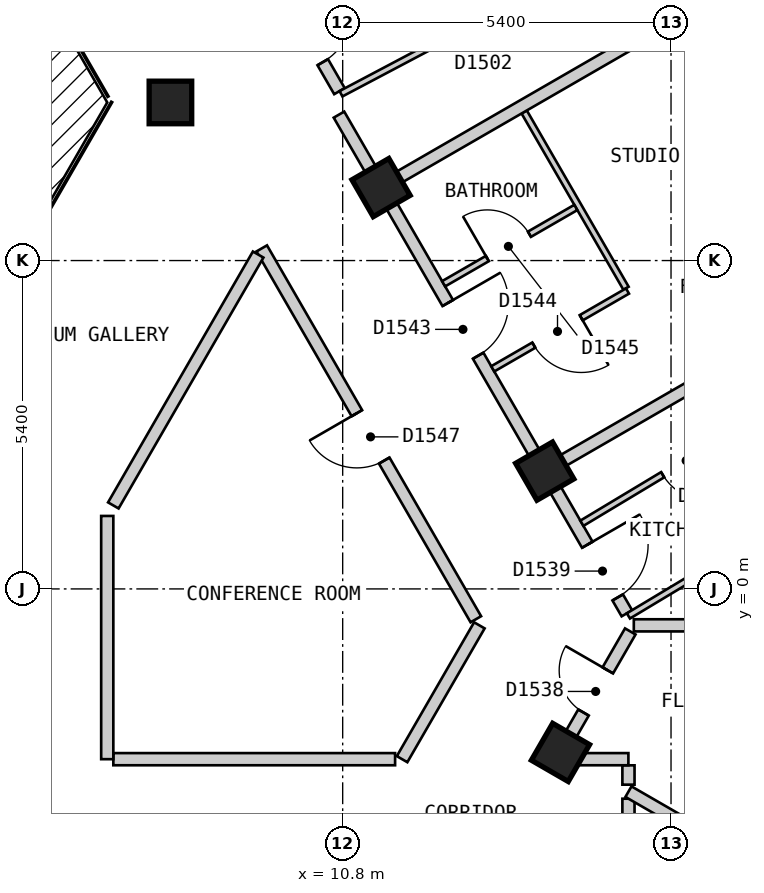
"""IFC4 building model, lengths in metres.
Left out: names, types, materials, properties, quantities, classifications, styles, units other than length and angle.
Written with IfcOpenShell. Run it as: python <this file> out.ifc"""

import sys

from ifc_helpers import new_model, si_unit, direction, frame, frame_2d, origin, origin_2d, place, context, subcontext, project, spatial, polyline, rectangle, outline, extrude, element, fill, save


model = new_model("IFC4")
c1 = context("Model", 3, precision=1e-05, world=origin(), true_north=direction((0.0, 1.0)))
c2 = subcontext(c1, "Body", "Model", "MODEL_VIEW")
j1 = project(units=[si_unit("LENGTHUNIT", "METRE"), si_unit("PLANEANGLEUNIT", "RADIAN")], contexts=[c1])
p1 = place(None, origin())
s1 = spatial("IfcSite", under=j1, at=p1, CompositionType="ELEMENT")
p2 = place(p1, origin())
s2 = spatial("IfcBuilding", under=s1, at=p2, CompositionType="ELEMENT")
p3 = place(p2, frame((0.0, 0.0, 190.2)))
s3 = spatial("IfcBuildingStorey", under=s2, at=p3, CompositionType="ELEMENT", Elevation=190.2)
for number, where, z_axis, x_axis in (
    (1, (14.382, -2.689, 0.0), (0.0, 0.0, 1.0), (0.5, 0.866, 0.0)),
    (2, (14.123, 1.937, 0.0), (0.0, 0.0, 1.0), (-0.5, 0.866, 0.0)),
    (3, (11.431, 6.6, 0.0), (0.0, 0.0, 1.0), (-0.5, 0.866, 0.0)),
    (4, (7.967, 8.0, 0.0), (0.0, 0.0, 1.0), (1.0, 0.0, 0.0)),
):
    element("IfcColumn", number, at=place(p3, frame(where, z_axis=z_axis, x_axis=x_axis)), inside=s3, PredefinedType="COLUMN", context=c2, shape_type="SweptSolid", body=[
        extrude(rectangle(XDim=0.7, YDim=0.7, at=origin_2d()), origin(), (0.0, 0.0, 1.0), 3.0),
    ])
p4 = place(p3, frame((15.631, -21.025, 0.0), z_axis=(0.0, 0.0, 1.0), x_axis=(0.500018670445, 0.86601462413, 0.0)))
e5 = element("IfcWall", 5, at=p4, inside=s3, PredefinedType="SOLIDWALL", context=c2, shape_type="SweptSolid", body=[
    extrude(outline(polyline([(0.0, -0.15), (20.785, -0.15), (20.705, 0.15), (0.08, 0.15), (0.0, -0.15)])), origin(), (0.0, 0.0, 1.0), 2.7),
])
p5 = place(p4, frame((1.13, 0.0, 0.15)))
e6 = element("IfcOpeningElement", 6, at=p5, cuts=e5, PredefinedType="OPENING", context=c2, shape_type="SweptSolid", body=[
    extrude(rectangle(XDim=1.5, YDim=2.1, at=frame_2d((0.75, 1.05))), frame((0.0, 0.16, 0.0), z_axis=(0.0, -1.0, 0.0), x_axis=(1.0, 0.0, 0.0)), (0.0, 0.0, 1.0), 0.32),
])
p6 = place(p4, frame((3.562, 0.0, 0.15)))
e7 = element("IfcOpeningElement", 7, at=p6, cuts=e5, PredefinedType="OPENING", context=c2, shape_type="SweptSolid", body=[
    extrude(rectangle(XDim=1.5, YDim=2.1, at=frame_2d((0.75, 1.05))), frame((0.0, 0.16, 0.0), z_axis=(0.0, -1.0, 0.0), x_axis=(1.0, 0.0, 0.0)), (0.0, 0.0, 1.0), 0.32),
])
p7 = place(p4, frame((5.994, 0.0, 0.15)))
e8 = element("IfcOpeningElement", 8, at=p7, cuts=e5, PredefinedType="OPENING", context=c2, shape_type="SweptSolid", body=[
    extrude(rectangle(XDim=1.5, YDim=2.1, at=frame_2d((0.75, 1.05))), frame((0.0, 0.16, 0.0), z_axis=(0.0, -1.0, 0.0), x_axis=(1.0, 0.0, 0.0)), (0.0, 0.0, 1.0), 0.32),
])
p8 = place(p4, frame((8.425, 0.0, 0.15)))
e9 = element("IfcOpeningElement", 9, at=p8, cuts=e5, PredefinedType="OPENING", context=c2, shape_type="SweptSolid", body=[
    extrude(rectangle(XDim=1.5, YDim=2.1, at=frame_2d((0.75, 1.05))), frame((0.0, 0.16, 0.0), z_axis=(0.0, -1.0, 0.0), x_axis=(1.0, 0.0, 0.0)), (0.0, 0.0, 1.0), 0.32),
])
p9 = place(p4, frame((10.857, 0.0, 0.15)))
e10 = element("IfcOpeningElement", 10, at=p9, cuts=e5, PredefinedType="OPENING", context=c2, shape_type="SweptSolid", body=[
    extrude(rectangle(XDim=1.5, YDim=2.1, at=frame_2d((0.75, 1.05))), frame((0.0, 0.16, 0.0), z_axis=(0.0, -1.0, 0.0), x_axis=(1.0, 0.0, 0.0)), (0.0, 0.0, 1.0), 0.32),
])
p10 = place(p4, frame((13.289, 0.0, 0.15)))
e11 = element("IfcOpeningElement", 11, at=p10, cuts=e5, PredefinedType="OPENING", context=c2, shape_type="SweptSolid", body=[
    extrude(rectangle(XDim=1.5, YDim=2.1, at=frame_2d((0.75, 1.05))), frame((0.0, 0.16, 0.0), z_axis=(0.0, -1.0, 0.0), x_axis=(1.0, 0.0, 0.0)), (0.0, 0.0, 1.0), 0.32),
])
p11 = place(p4, frame((15.722, 0.0, 0.15)))
e12 = element("IfcOpeningElement", 12, at=p11, cuts=e5, PredefinedType="OPENING", context=c2, shape_type="SweptSolid", body=[
    extrude(rectangle(XDim=1.5, YDim=2.1, at=frame_2d((0.75, 1.05))), frame((0.0, 0.16, 0.0), z_axis=(0.0, -1.0, 0.0), x_axis=(1.0, 0.0, 0.0)), (0.0, 0.0, 1.0), 0.32),
])
p12 = place(p4, frame((18.154, 0.0, 0.15)))
e13 = element("IfcOpeningElement", 13, at=p12, cuts=e5, PredefinedType="OPENING", context=c2, shape_type="SweptSolid", body=[
    extrude(rectangle(XDim=1.5, YDim=2.1, at=frame_2d((0.75, 1.05))), frame((0.0, 0.16, 0.0), z_axis=(0.0, -1.0, 0.0), x_axis=(1.0, 0.0, 0.0)), (0.0, 0.0, 1.0), 0.32),
])
p13 = place(p3, frame((26.024, 1.825, 0.0), z_axis=(0.0, 0.0, 1.0), x_axis=(-0.500010537973, 0.866019319597, 0.0)))
e14 = element("IfcWall", 14, at=p13, inside=s3, PredefinedType="SOLIDWALL", context=c2, shape_type="SweptSolid", body=[
    extrude(outline(polyline([(0.0, -0.15), (22.863, -0.15), (22.783, 0.15), (0.08, 0.15), (0.0, -0.15)])), origin(), (0.0, 0.0, 1.0), 2.7),
])
p14 = place(p13, frame((1.259, 0.0, 0.15)))
e15 = element("IfcOpeningElement", 15, at=p14, cuts=e14, PredefinedType="OPENING", context=c2, shape_type="SweptSolid", body=[
    extrude(rectangle(XDim=1.5, YDim=2.1, at=frame_2d((0.75, 1.05))), frame((0.0, 0.16, 0.0), z_axis=(0.0, -1.0, 0.0), x_axis=(1.0, 0.0, 0.0)), (0.0, 0.0, 1.0), 0.32),
])
p15 = place(p13, frame((3.952, 0.0, 0.15)))
e16 = element("IfcOpeningElement", 16, at=p15, cuts=e14, PredefinedType="OPENING", context=c2, shape_type="SweptSolid", body=[
    extrude(rectangle(XDim=1.5, YDim=2.1, at=frame_2d((0.75, 1.05))), frame((0.0, 0.16, 0.0), z_axis=(0.0, -1.0, 0.0), x_axis=(1.0, 0.0, 0.0)), (0.0, 0.0, 1.0), 0.32),
])
p16 = place(p13, frame((6.644, 0.0, 0.15)))
e17 = element("IfcOpeningElement", 17, at=p16, cuts=e14, PredefinedType="OPENING", context=c2, shape_type="SweptSolid", body=[
    extrude(rectangle(XDim=1.5, YDim=2.1, at=frame_2d((0.75, 1.05))), frame((0.0, 0.16, 0.0), z_axis=(0.0, -1.0, 0.0), x_axis=(1.0, 0.0, 0.0)), (0.0, 0.0, 1.0), 0.32),
])
p17 = place(p13, frame((9.335, 0.0, 0.15)))
e18 = element("IfcOpeningElement", 18, at=p17, cuts=e14, PredefinedType="OPENING", context=c2, shape_type="SweptSolid", body=[
    extrude(rectangle(XDim=1.5, YDim=2.1, at=frame_2d((0.75, 1.05))), frame((0.0, 0.16, 0.0), z_axis=(0.0, -1.0, 0.0), x_axis=(1.0, 0.0, 0.0)), (0.0, 0.0, 1.0), 0.32),
])
p18 = place(p13, frame((12.028, 0.0, 0.15)))
e19 = element("IfcOpeningElement", 19, at=p18, cuts=e14, PredefinedType="OPENING", context=c2, shape_type="SweptSolid", body=[
    extrude(rectangle(XDim=1.5, YDim=2.1, at=frame_2d((0.75, 1.05))), frame((0.0, 0.16, 0.0), z_axis=(0.0, -1.0, 0.0), x_axis=(1.0, 0.0, 0.0)), (0.0, 0.0, 1.0), 0.32),
])
p19 = place(p13, frame((14.72, 0.0, 0.15)))
e20 = element("IfcOpeningElement", 20, at=p19, cuts=e14, PredefinedType="OPENING", context=c2, shape_type="SweptSolid", body=[
    extrude(rectangle(XDim=1.5, YDim=2.1, at=frame_2d((0.75, 1.05))), frame((0.0, 0.16, 0.0), z_axis=(0.0, -1.0, 0.0), x_axis=(1.0, 0.0, 0.0)), (0.0, 0.0, 1.0), 0.32),
])
p20 = place(p13, frame((17.411, 0.0, 0.15)))
e21 = element("IfcOpeningElement", 21, at=p20, cuts=e14, PredefinedType="OPENING", context=c2, shape_type="SweptSolid", body=[
    extrude(rectangle(XDim=1.5, YDim=2.1, at=frame_2d((0.75, 1.05))), frame((0.0, 0.16, 0.0), z_axis=(0.0, -1.0, 0.0), x_axis=(1.0, 0.0, 0.0)), (0.0, 0.0, 1.0), 0.32),
])
p21 = place(p13, frame((20.104, 0.0, 0.15)))
e22 = element("IfcOpeningElement", 22, at=p21, cuts=e14, PredefinedType="OPENING", context=c2, shape_type="SweptSolid", body=[
    extrude(rectangle(XDim=1.5, YDim=2.1, at=frame_2d((0.75, 1.05))), frame((0.0, 0.16, 0.0), z_axis=(0.0, -1.0, 0.0), x_axis=(1.0, 0.0, 0.0)), (0.0, 0.0, 1.0), 0.32),
])
p22 = place(p3, frame((9.469, 5.6, 0.0), z_axis=(0.0, 0.0, 1.0), x_axis=(0.499964524401, -0.866045884662, 0.0)))
e23 = element("IfcWall", 23, at=p22, inside=s3, PredefinedType="PARTITIONING", context=c2, shape_type="SweptSolid", body=[
    extrude(rectangle(XDim=7.042, YDim=0.2, at=frame_2d((3.521, 0.0))), origin(), (0.0, 0.0, 1.0), 2.7),
])
p23 = place(p22, frame((3.129, 0.0, 0.0)))
e24 = element("IfcOpeningElement", 24, at=p23, cuts=e23, PredefinedType="OPENING", context=c2, shape_type="SweptSolid", body=[
    extrude(rectangle(XDim=0.9, YDim=2.1, at=frame_2d((0.45, 1.05))), frame((0.0, 0.11, 0.0), z_axis=(0.0, -1.0, 0.0), x_axis=(1.0, 0.0, 0.0)), (0.0, 0.0, 1.0), 0.22),
])
p24 = place(p3, frame((10.739, 7.8, 0.0), z_axis=(0.0, 0.0, 1.0), x_axis=(0.500023726918, -0.866011704609, 0.0)))
e25 = element("IfcWall", 25, at=p24, inside=s3, PredefinedType="PARTITIONING", context=c2, shape_type="SweptSolid", body=[
    extrude(rectangle(XDim=9.47, YDim=0.2, at=frame_2d((4.735, 0.0))), origin(), (0.0, 0.0, 1.0), 2.7),
])
p25 = place(p24, frame((8.168, 0.0, 0.0)))
e26 = element("IfcOpeningElement", 26, at=p25, cuts=e25, PredefinedType="OPENING", context=c2, shape_type="SweptSolid", body=[
    extrude(rectangle(XDim=1.0, YDim=2.1, at=frame_2d((0.5, 1.05))), frame((0.0, 0.11, 0.0), z_axis=(0.0, -1.0, 0.0), x_axis=(1.0, 0.0, 0.0)), (0.0, 0.0, 1.0), 0.22),
])
p26 = place(p24, frame((3.578, 0.0, 0.0)))
e27 = element("IfcOpeningElement", 27, at=p26, cuts=e25, PredefinedType="OPENING", context=c2, shape_type="SweptSolid", body=[
    extrude(rectangle(XDim=1.0, YDim=2.1, at=frame_2d((0.5, 1.05))), frame((0.0, 0.11, 0.0), z_axis=(0.0, -1.0, 0.0), x_axis=(1.0, 0.0, 0.0)), (0.0, 0.0, 1.0), 0.22),
])
p27 = place(p3, frame((5.485, 17.3, 0.0), z_axis=(0.0, 0.0, 1.0), x_axis=(0.499998905622, -0.866026035623, 0.0)))
e28 = element("IfcWall", 28, at=p27, inside=s3, PredefinedType="PARTITIONING", context=c2, shape_type="SweptSolid", body=[
    extrude(rectangle(XDim=10.524, YDim=0.2, at=frame_2d((5.262, 0.0))), origin(), (0.0, 0.0, 1.0), 2.7),
])
p28 = place(p27, frame((8.974, 0.0, 0.0)))
e29 = element("IfcOpeningElement", 29, at=p28, cuts=e28, PredefinedType="OPENING", context=c2, shape_type="SweptSolid", body=[
    extrude(rectangle(XDim=1.0, YDim=2.1, at=frame_2d((0.5, 1.05))), frame((0.0, 0.11, 0.0), z_axis=(0.0, -1.0, 0.0), x_axis=(1.0, 0.0, 0.0)), (0.0, 0.0, 1.0), 0.22),
])
p29 = place(p3, frame((15.5, -2.901, 0.0), z_axis=(0.0, 0.0, 1.0), x_axis=(0.0, -1.0, 0.0)))
e30 = element("IfcWall", 30, at=p29, inside=s3, PredefinedType="PARTITIONING", context=c2, shape_type="SweptSolid", body=[
    extrude(rectangle(XDim=0.318, YDim=0.2, at=frame_2d((0.159, 0.0))), origin(), (0.0, 0.0, 1.0), 2.7),
])
p30 = place(p3, frame((7.028, -2.8, 0.0), z_axis=(0.0, 0.0, 1.0), x_axis=(1.0, 0.0, 0.0)))
e31 = element("IfcWall", 31, at=p30, inside=s3, PredefinedType="PARTITIONING", context=c2, shape_type="SweptSolid", body=[
    extrude(rectangle(XDim=4.634, YDim=0.2, at=frame_2d((2.317, 0.0))), origin(), (0.0, 0.0, 1.0), 2.7),
])
p31 = place(p3, frame((14.433, -2.8, 0.0), z_axis=(0.0, 0.0, 1.0), x_axis=(1.0, 0.0, 0.0)))
e32 = element("IfcWall", 32, at=p31, inside=s3, PredefinedType="PARTITIONING", context=c2, shape_type="SweptSolid", body=[
    extrude(rectangle(XDim=1.066, YDim=0.2, at=frame_2d((0.533, 0.0))), origin(), (0.0, 0.0, 1.0), 2.7),
])
p32 = place(p3, frame((7.028, 1.373, 0.0), z_axis=(0.0, 0.0, 1.0), x_axis=(0.499953126767, 0.866052464367, 0.0)))
e33 = element("IfcWall", 33, at=p32, inside=s3, PredefinedType="PARTITIONING", context=c2, shape_type="SweptSolid", body=[
    extrude(rectangle(XDim=4.764, YDim=0.2, at=frame_2d((2.382, 0.0))), origin(), (0.0, 0.0, 1.0), 2.7),
])
p33 = place(p3, frame((11.777, -2.8, 0.0), z_axis=(0.0, 0.0, 1.0), x_axis=(0.500085537782, 0.86597601289, 0.0)))
e34 = element("IfcWall", 34, at=p33, inside=s3, PredefinedType="PARTITIONING", context=c2, shape_type="SweptSolid", body=[
    extrude(rectangle(XDim=2.542, YDim=0.2, at=frame_2d((1.271, 0.0))), origin(), (0.0, 0.0, 1.0), 2.7),
])
p34 = place(p3, frame((14.318, -2.8, 0.0), z_axis=(0.0, 0.0, 1.0), x_axis=(0.49964693309, 0.866229151122, 0.0)))
e35 = element("IfcWall", 35, at=p34, inside=s3, PredefinedType="PARTITIONING", context=c2, shape_type="SweptSolid", body=[
    extrude(rectangle(XDim=2.426, YDim=0.2, at=frame_2d((1.213, 0.0))), origin(), (0.0, 0.0, 1.0), 2.7),
])
p35 = place(p34, frame((0.886, 0.0, 0.0)))
e36 = element("IfcOpeningElement", 36, at=p35, cuts=e35, PredefinedType="OPENING", context=c2, shape_type="SweptSolid", body=[
    extrude(rectangle(XDim=0.8, YDim=2.1, at=frame_2d((0.4, 1.05))), frame((0.0, 0.11, 0.0), z_axis=(0.0, -1.0, 0.0), x_axis=(1.0, 0.0, 0.0)), (0.0, 0.0, 1.0), 0.22),
])
p36 = place(p3, frame((6.928, -2.8, 0.0), z_axis=(0.0, 0.0, 1.0), x_axis=(0.0, 1.0, 0.0)))
e37 = element("IfcWall", 37, at=p36, inside=s3, PredefinedType="PARTITIONING", context=c2, shape_type="SweptSolid", body=[
    extrude(rectangle(XDim=4.0, YDim=0.2, at=frame_2d((2.0, 0.0))), origin(), (0.0, 0.0, 1.0), 2.7),
])
p37 = place(p3, frame((15.5, -18.799, 0.0), z_axis=(0.0, 0.0, 1.0), x_axis=(0.0, 1.0, 0.0)))
e38 = element("IfcWall", 38, at=p37, inside=s3, PredefinedType="PARTITIONING", context=c2, shape_type="SweptSolid", body=[
    extrude(rectangle(XDim=15.349, YDim=0.2, at=frame_2d((7.675, 0.0))), origin(), (0.0, 0.0, 1.0), 2.7),
])
p38 = place(p37, frame((4.477, 0.0, 0.0)))
e39 = element("IfcOpeningElement", 39, at=p38, cuts=e38, PredefinedType="OPENING", context=c2, shape_type="SweptSolid", body=[
    extrude(rectangle(XDim=0.8, YDim=2.1, at=frame_2d((0.4, 1.05))), frame((0.0, 0.11, 0.0), z_axis=(0.0, -1.0, 0.0), x_axis=(1.0, 0.0, 0.0)), (0.0, 0.0, 1.0), 0.22),
])
p39 = place(p37, frame((11.348, 0.0, 0.0)))
e40 = element("IfcOpeningElement", 40, at=p39, cuts=e38, PredefinedType="OPENING", context=c2, shape_type="SweptSolid", body=[
    extrude(rectangle(XDim=1.0, YDim=2.1, at=frame_2d((0.5, 1.05))), frame((0.0, 0.11, 0.0), z_axis=(0.0, -1.0, 0.0), x_axis=(1.0, 0.0, 0.0)), (0.0, 0.0, 1.0), 0.22),
])
p40 = place(p3, frame((13.785, 7.844, 0.0), z_axis=(0.0, 0.0, 1.0), x_axis=(0.500176784828, -0.865923312955, 0.0)))
e41 = element("IfcWall", 41, at=p40, inside=s3, PredefinedType="PARTITIONING", context=c2, shape_type="SweptSolid", body=[
    extrude(rectangle(XDim=3.349, YDim=0.1, at=frame_2d((1.674, 0.0))), origin(), (0.0, 0.0, 1.0), 2.7),
])
p41 = place(p3, frame((10.772, 8.143, 0.0), z_axis=(0.0, 0.0, 1.0), x_axis=(0.884049480227, 0.467393320995, 0.0)))
e42 = element("IfcWall", 42, at=p41, inside=s3, PredefinedType="PARTITIONING", context=c2, shape_type="SweptSolid", body=[
    extrude(rectangle(XDim=4.153, YDim=0.1, at=frame_2d((2.076, 0.0))), origin(), (0.0, 0.0, 1.0), 2.7),
])
p42 = place(p41, frame((1.701, 0.0, 0.0)))
e43 = element("IfcOpeningElement", 43, at=p42, cuts=e42, PredefinedType="OPENING", context=c2, shape_type="SweptSolid", body=[
    extrude(rectangle(XDim=0.8, YDim=2.1, at=frame_2d((0.4, 1.05))), frame((0.0, 0.06, 0.0), z_axis=(0.0, -1.0, 0.0), x_axis=(1.0, 0.0, 0.0)), (0.0, 0.0, 1.0), 0.12),
])
p43 = place(p3, frame((13.268, 3.619, 0.0), z_axis=(0.0, 0.0, 1.0), x_axis=(0.865902724456, 0.500212426655, 0.0)))
e44 = element("IfcWall", 44, at=p43, inside=s3, PredefinedType="PARTITIONING", context=c2, shape_type="SweptSolid", body=[
    extrude(rectangle(XDim=2.559, YDim=0.1, at=frame_2d((1.28, 0.0))), origin(), (0.0, 0.0, 1.0), 2.7),
])
p44 = place(p43, frame((0.78, 0.0, 0.0)))
e45 = element("IfcOpeningElement", 45, at=p44, cuts=e44, PredefinedType="OPENING", context=c2, shape_type="SweptSolid", body=[
    extrude(rectangle(XDim=0.9, YDim=2.1, at=frame_2d((0.45, 1.05))), frame((0.0, 0.06, 0.0), z_axis=(0.0, -1.0, 0.0), x_axis=(1.0, 0.0, 0.0)), (0.0, 0.0, 1.0), 0.12),
])
p45 = place(p3, frame((12.46, 5.018, 0.0), z_axis=(0.0, 0.0, 1.0), x_axis=(0.866080321209, 0.499904868165, 0.0)))
e46 = element("IfcWall", 46, at=p45, inside=s3, PredefinedType="PARTITIONING", context=c2, shape_type="SweptSolid", body=[
    extrude(rectangle(XDim=2.51, YDim=0.1, at=frame_2d((1.255, 0.0))), origin(), (0.0, 0.0, 1.0), 2.7),
])
p46 = place(p45, frame((0.83, 0.0, 0.0)))
e47 = element("IfcOpeningElement", 47, at=p46, cuts=e46, PredefinedType="OPENING", context=c2, shape_type="SweptSolid", body=[
    extrude(rectangle(XDim=0.8, YDim=2.1, at=frame_2d((0.4, 1.05))), frame((0.0, 0.06, 0.0), z_axis=(0.0, -1.0, 0.0), x_axis=(1.0, 0.0, 0.0)), (0.0, 0.0, 1.0), 0.12),
])
p47 = place(p3, frame((14.734, 1.08, 0.0), z_axis=(0.0, 0.0, 1.0), x_axis=(0.857205608004, 0.514974315482, 0.0)))
e48 = element("IfcWall", 48, at=p47, inside=s3, PredefinedType="PARTITIONING", context=c2, shape_type="SweptSolid", body=[
    extrude(rectangle(XDim=4.051, YDim=0.1, at=frame_2d((2.025, 0.0))), origin(), (0.0, 0.0, 1.0), 2.7),
])
p48 = place(p47, frame((1.55, 0.0, 0.0)))
e49 = element("IfcOpeningElement", 49, at=p48, cuts=e48, PredefinedType="OPENING", context=c2, shape_type="SweptSolid", body=[
    extrude(rectangle(XDim=0.9, YDim=2.1, at=frame_2d((0.45, 1.05))), frame((0.0, 0.06, 0.0), z_axis=(0.0, -1.0, 0.0), x_axis=(1.0, 0.0, 0.0)), (0.0, 0.0, 1.0), 0.12),
])
p49 = place(p3, frame((15.499, -0.444, 0.0), z_axis=(0.0, 0.0, 1.0), x_axis=(0.857061798163, 0.515213619899, 0.0)))
e50 = element("IfcWall", 50, at=p49, inside=s3, PredefinedType="PARTITIONING", context=c2, shape_type="SweptSolid", body=[
    extrude(rectangle(XDim=4.15, YDim=0.1, at=frame_2d((2.075, 0.0))), origin(), (0.0, 0.0, 1.0), 2.7),
])
p50 = place(p49, frame((1.7, 0.0, 0.0)))
e51 = element("IfcOpeningElement", 51, at=p50, cuts=e50, PredefinedType="OPENING", context=c2, shape_type="SweptSolid", body=[
    extrude(rectangle(XDim=0.8, YDim=2.1, at=frame_2d((0.4, 1.05))), frame((0.0, 0.06, 0.0), z_axis=(0.0, -1.0, 0.0), x_axis=(1.0, 0.0, 0.0)), (0.0, 0.0, 1.0), 0.12),
])
p51 = place(p3, frame((15.5, -3.334, 0.0), z_axis=(0.0, 0.0, 1.0), x_axis=(0.866001896501, -0.5000407136, 0.0)))
e52 = element("IfcWall", 52, at=p51, inside=s3, PredefinedType="PARTITIONING", context=c2, shape_type="SweptSolid", body=[
    extrude(rectangle(XDim=8.809, YDim=0.2, at=frame_2d((4.405, 0.0))), origin(), (0.0, 0.0, 1.0), 2.7),
])
p52 = place(p3, frame((15.588, -0.599, 0.0), z_axis=(0.0, 0.0, 1.0), x_axis=(1.0, 0.0, 0.0)))
e53 = element("IfcWall", 53, at=p52, inside=s3, PredefinedType="PARTITIONING", context=c2, shape_type="SweptSolid", body=[
    extrude(rectangle(XDim=10.266, YDim=0.2, at=frame_2d((5.133, 0.0))), origin(), (0.0, 0.0, 1.0), 2.7),
])
p53 = place(p3, frame((14.21, 1.987, 0.0), z_axis=(0.0, 0.0, 1.0), x_axis=(0.866022959057, 0.500004234368, 0.0)))
e54 = element("IfcWall", 54, at=p53, inside=s3, PredefinedType="PARTITIONING", context=c2, shape_type="SweptSolid", body=[
    extrude(rectangle(XDim=10.0, YDim=0.2, at=frame_2d((5.0, 0.0))), origin(), (0.0, 0.0, 1.0), 2.7),
])
p54 = place(p3, frame((11.518, 6.65, 0.0), z_axis=(0.0, 0.0, 1.0), x_axis=(0.866016855193, 0.500014806302, 0.0)))
e55 = element("IfcWall", 55, at=p54, inside=s3, PredefinedType="PARTITIONING", context=c2, shape_type="SweptSolid", body=[
    extrude(rectangle(XDim=10.0, YDim=0.2, at=frame_2d((5.0, 0.0))), origin(), (0.0, 0.0, 1.0), 2.7),
])
p55 = place(p28, origin())
e56 = element("IfcDoor", 56, at=p55, inside=s3, OperationType="SINGLE_SWING_LEFT", PredefinedType="DOOR", context=c2, shape_type="SweptSolid", body=[
    extrude(rectangle(XDim=1.0, YDim=2.1, at=frame_2d((0.5, 1.05))), frame((0.0, 0.025, 0.0), z_axis=(0.0, -1.0, 0.0), x_axis=(1.0, 0.0, 0.0)), (0.0, 0.0, 1.0), 0.05),
])
fill(e29, e56)
p56 = place(p35, origin())
e57 = element("IfcDoor", 57, at=p56, inside=s3, OperationType="SINGLE_SWING_RIGHT", PredefinedType="DOOR", context=c2, shape_type="SweptSolid", body=[
    extrude(rectangle(XDim=0.8, YDim=2.1, at=frame_2d((0.4, 1.05))), frame((0.0, 0.025, 0.0), z_axis=(0.0, -1.0, 0.0), x_axis=(1.0, 0.0, 0.0)), (0.0, 0.0, 1.0), 0.05),
])
fill(e36, e57)
p57 = place(p25, origin())
e58 = element("IfcDoor", 58, at=p57, inside=s3, OperationType="SINGLE_SWING_LEFT", PredefinedType="DOOR", context=c2, shape_type="SweptSolid", body=[
    extrude(rectangle(XDim=1.0, YDim=2.1, at=frame_2d((0.5, 1.05))), frame((0.0, 0.025, 0.0), z_axis=(0.0, -1.0, 0.0), x_axis=(1.0, 0.0, 0.0)), (0.0, 0.0, 1.0), 0.05),
])
fill(e26, e58)
p58 = place(p48, origin())
e59 = element("IfcDoor", 59, at=p58, inside=s3, OperationType="SINGLE_SWING_RIGHT", PredefinedType="DOOR", context=c2, shape_type="SweptSolid", body=[
    extrude(rectangle(XDim=0.9, YDim=2.1, at=frame_2d((0.45, 1.05))), frame((0.0, 0.025, 0.0), z_axis=(0.0, -1.0, 0.0), x_axis=(1.0, 0.0, 0.0)), (0.0, 0.0, 1.0), 0.05),
])
fill(e49, e59)
p59 = place(p26, origin())
e60 = element("IfcDoor", 60, at=p59, inside=s3, OperationType="SINGLE_SWING_LEFT", PredefinedType="DOOR", context=c2, shape_type="SweptSolid", body=[
    extrude(rectangle(XDim=1.0, YDim=2.1, at=frame_2d((0.5, 1.05))), frame((0.0, 0.025, 0.0), z_axis=(0.0, -1.0, 0.0), x_axis=(1.0, 0.0, 0.0)), (0.0, 0.0, 1.0), 0.05),
])
fill(e27, e60)
p60 = place(p44, origin())
e61 = element("IfcDoor", 61, at=p60, inside=s3, OperationType="SINGLE_SWING_RIGHT", PredefinedType="DOOR", context=c2, shape_type="SweptSolid", body=[
    extrude(rectangle(XDim=0.9, YDim=2.1, at=frame_2d((0.45, 1.05))), frame((0.0, 0.025, 0.0), z_axis=(0.0, -1.0, 0.0), x_axis=(1.0, 0.0, 0.0)), (0.0, 0.0, 1.0), 0.05),
])
fill(e45, e61)
p61 = place(p46, origin())
e62 = element("IfcDoor", 62, at=p61, inside=s3, OperationType="SINGLE_SWING_LEFT", PredefinedType="DOOR", context=c2, shape_type="SweptSolid", body=[
    extrude(rectangle(XDim=0.8, YDim=2.1, at=frame_2d((0.4, 1.05))), frame((0.0, 0.025, 0.0), z_axis=(0.0, -1.0, 0.0), x_axis=(1.0, 0.0, 0.0)), (0.0, 0.0, 1.0), 0.05),
])
fill(e47, e62)
p62 = place(p23, origin())
e63 = element("IfcDoor", 63, at=p62, inside=s3, OperationType="SINGLE_SWING_LEFT", PredefinedType="DOOR", context=c2, shape_type="SweptSolid", body=[
    extrude(rectangle(XDim=0.9, YDim=2.1, at=frame_2d((0.45, 1.05))), frame((0.0, 0.025, 0.0), z_axis=(0.0, -1.0, 0.0), x_axis=(1.0, 0.0, 0.0)), (0.0, 0.0, 1.0), 0.05),
])
fill(e24, e63)
save(model, sys.argv[1])
